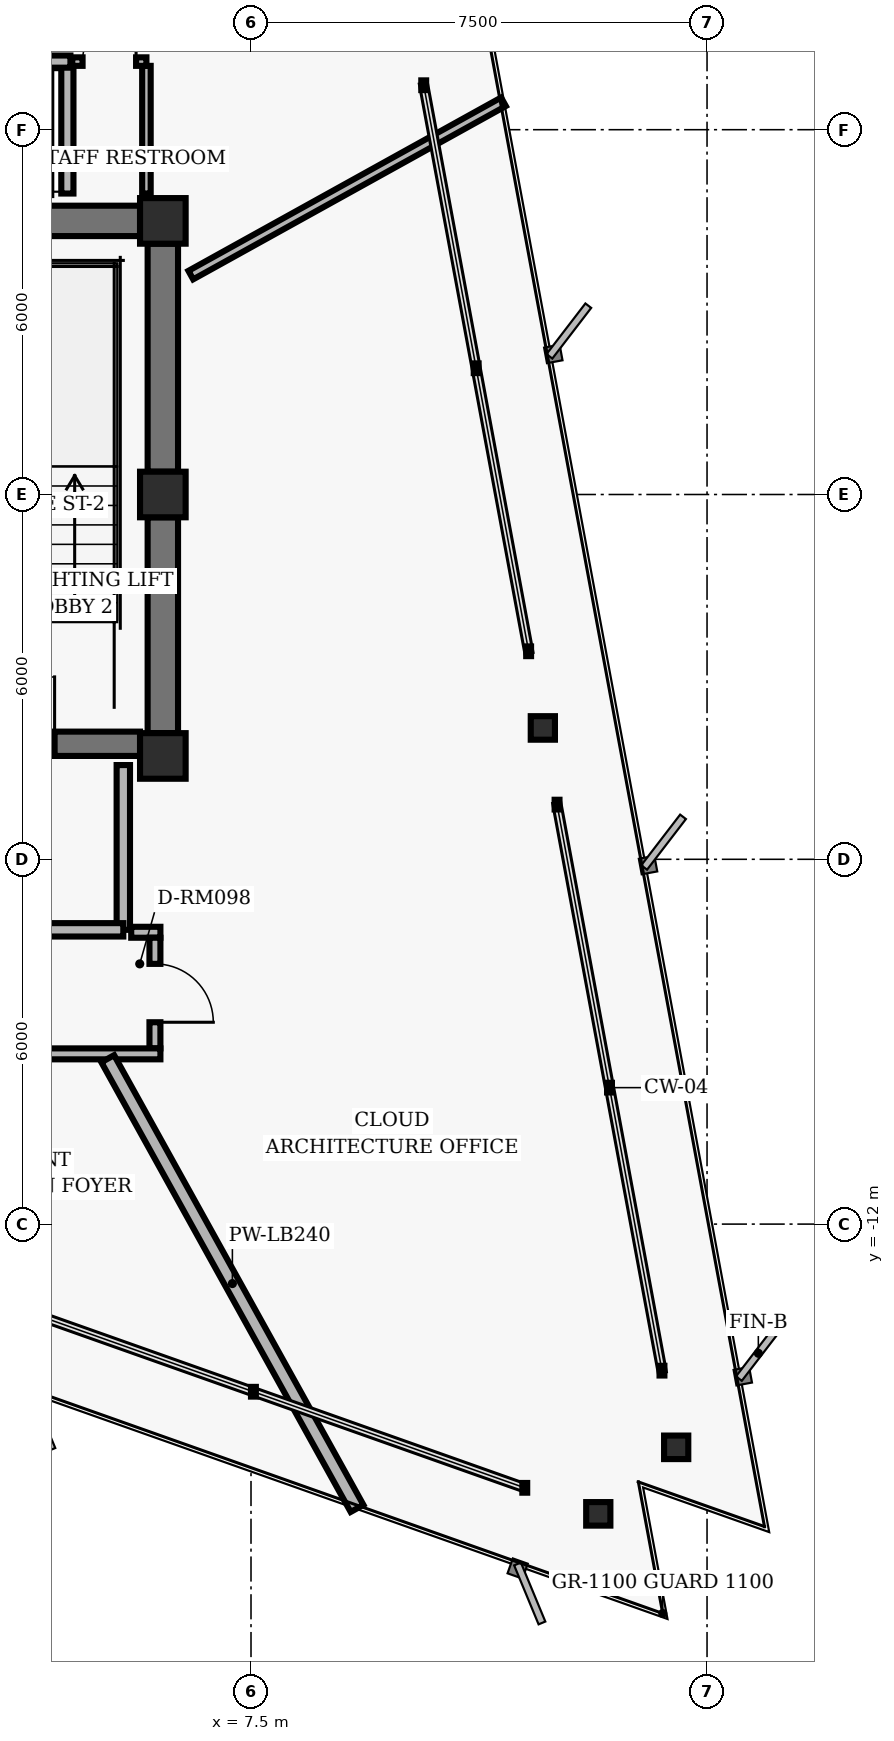
"""IFC4 building model, lengths in metres.
Left out: names, types, materials, properties, quantities, classifications, styles, units other than length and angle.
Written with IfcOpenShell. Run it as: python <this file> out.ifc"""

import sys

from ifc_helpers import new_model, si_unit, direction, frame, frame_2d, origin, origin_2d, place, context, subcontext, project, spatial, rectangle, hollow_rectangle, i_section, extrude, element, fill, save


model = new_model("IFC4")
c1 = context("Model", 3, precision=1e-05, world=origin(), true_north=direction((0.0, 1.0)))
c2 = subcontext(c1, "Body", "Model", "MODEL_VIEW")
j1 = project(units=[si_unit("LENGTHUNIT", "METRE"), si_unit("PLANEANGLEUNIT", "RADIAN")], contexts=[c1])
p1 = place(None, origin())
s1 = spatial("IfcSite", under=j1, at=p1, CompositionType="ELEMENT")
p2 = place(p1, origin())
s2 = spatial("IfcBuilding", under=s1, at=p2, CompositionType="ELEMENT")
p3 = place(p2, frame((0.0, 0.0, 178.4)))
s3 = spatial("IfcBuildingStorey", under=s2, at=p3, CompositionType="ELEMENT", Elevation=178.4)
for number, where, z_axis, x_axis in (
    (1, (6.05, 4.5, 0.0), (0.0, 0.0, 1.0), (1.0, 0.0, 0.0)),
    (2, (6.05, 0.0, 0.0), (0.0, 0.0, 1.0), (1.0, 0.0, 0.0)),
    (3, (6.05, -4.3, 0.0), (0.0, 0.0, 1.0), (1.0, 0.0, 0.0)),
):
    element("IfcColumn", number, at=place(p3, frame(where, z_axis=z_axis, x_axis=x_axis)), inside=s3, PredefinedType="COLUMN", context=c2, shape_type="SweptSolid", body=[
        extrude(hollow_rectangle(XDim=0.75, YDim=0.75, WallThickness=0.05, InnerFilletRadius=0.02, OuterFilletRadius=0.04, at=origin_2d()), origin(), (0.0, 0.0, 1.0), 3.04),
    ])
p4 = place(p3, frame((6.05, 0.375, 0.0), z_axis=(0.0, 0.0, 1.0), x_axis=(0.0, 1.0, 0.0)))
e4 = element("IfcWall", 4, at=p4, inside=s3, PredefinedType="SHEAR", context=c2, shape_type="SweptSolid", body=[
    extrude(rectangle(XDim=3.75, YDim=0.5, at=frame_2d((1.875, 0.0))), origin(), (0.0, 0.0, 1.0), 2.798),
])
p5 = place(p3, frame((6.05, -3.925, 0.0), z_axis=(0.0, 0.0, 1.0), x_axis=(0.0, 1.0, 0.0)))
e5 = element("IfcWall", 5, at=p5, inside=s3, PredefinedType="SHEAR", context=c2, shape_type="SweptSolid", body=[
    extrude(rectangle(XDim=3.55, YDim=0.5, at=frame_2d((1.775, 0.0))), origin(), (0.0, 0.0, 1.0), 2.798),
])
p6 = place(p3, frame((-5.675, -4.1, 0.0), z_axis=(0.0, 0.0, 1.0), x_axis=(1.0, 0.0, 0.0)))
e6 = element("IfcWall", 6, at=p6, inside=s3, PredefinedType="SHEAR", context=c2, shape_type="SweptSolid", body=[
    extrude(rectangle(XDim=11.35, YDim=0.4, at=frame_2d((5.675, 0.0))), origin(), (0.0, 0.0, 1.0), 2.798),
])
p7 = place(p6, frame((1.405, 0.0, 0.0)))
e7 = element("IfcOpeningElement", 7, at=p7, cuts=e6, PredefinedType="OPENING", context=c2, shape_type="SweptSolid", body=[
    extrude(rectangle(XDim=1.1, YDim=2.04, at=frame_2d((0.55, 1.02))), frame((0.0, 0.21, 0.0), z_axis=(0.0, -1.0, 0.0), x_axis=(1.0, 0.0, 0.0)), (0.0, 0.0, 1.0), 0.42),
])
p8 = place(p6, frame((8.845, 0.0, 0.0)))
e8 = element("IfcOpeningElement", 8, at=p8, cuts=e6, PredefinedType="OPENING", context=c2, shape_type="SweptSolid", body=[
    extrude(rectangle(XDim=1.1, YDim=2.04, at=frame_2d((0.55, 1.02))), frame((0.0, 0.21, 0.0), z_axis=(0.0, -1.0, 0.0), x_axis=(1.0, 0.0, 0.0)), (0.0, 0.0, 1.0), 0.42),
])
p9 = place(p6, frame((4.145, 0.0, 0.0)))
e9 = element("IfcOpeningElement", 9, at=p9, cuts=e6, PredefinedType="OPENING", context=c2, shape_type="SweptSolid", body=[
    extrude(rectangle(XDim=1.06, YDim=2.04, at=frame_2d((0.53, 1.02))), frame((0.0, 0.21, 0.0), z_axis=(0.0, -1.0, 0.0), x_axis=(1.0, 0.0, 0.0)), (0.0, 0.0, 1.0), 0.42),
])
p10 = place(p6, frame((6.145, 0.0, 0.0)))
e10 = element("IfcOpeningElement", 10, at=p10, cuts=e6, PredefinedType="OPENING", context=c2, shape_type="SweptSolid", body=[
    extrude(rectangle(XDim=1.06, YDim=2.04, at=frame_2d((0.53, 1.02))), frame((0.0, 0.21, 0.0), z_axis=(0.0, -1.0, 0.0), x_axis=(1.0, 0.0, 0.0)), (0.0, 0.0, 1.0), 0.42),
])
p11 = place(p3, frame((2.05, 4.5, 0.0), z_axis=(0.0, 0.0, 1.0), x_axis=(1.0, 0.0, 0.0)))
e11 = element("IfcWall", 11, at=p11, inside=s3, PredefinedType="SHEAR", context=c2, shape_type="SweptSolid", body=[
    extrude(rectangle(XDim=3.625, YDim=0.5, at=frame_2d((1.812, 0.0))), origin(), (0.0, 0.0, 1.0), 2.798),
])
for number, where, z_axis, x_axis in (
    (12, (14.492, -15.671, 0.0), (0.0, 0.0, 1.0), (1.0, 0.0, 0.0)),
    (13, (12.3, -3.84, 0.0), (0.0, 0.0, 1.0), (1.0, 0.0, 0.0)),
    (14, (13.211, -16.766, 0.0), (0.0, 0.0, 1.0), (1.0, 0.0, 0.0)),
):
    element("IfcColumn", number, at=place(p3, frame(where, z_axis=z_axis, x_axis=x_axis)), inside=s3, PredefinedType="COLUMN", context=c2, shape_type="SweptSolid", body=[
        extrude(i_section(OverallWidth=0.398, OverallDepth=0.387, WebThickness=0.021, FlangeThickness=0.033, FilletRadius=0.018, at=origin_2d()), origin(), (0.0, 0.0, 1.0), 3.04),
    ])
p12 = place(p3, frame((5.4, -7.16, 0.0), z_axis=(0.0, 0.0, 1.0), x_axis=(0.0, 1.0, 0.0)))
e15 = element("IfcWall", 15, at=p12, inside=s3, PredefinedType="PARTITIONING", context=c2, shape_type="SweptSolid", body=[
    extrude(rectangle(XDim=2.71, YDim=0.22, at=frame_2d((1.355, 0.0))), origin(), (0.0, 0.0, 1.0), 2.773),
])
p13 = place(p3, frame((0.0, -7.16, 0.0), z_axis=(0.0, 0.0, 1.0), x_axis=(1.0, 0.0, 0.0)))
e16 = element("IfcWall", 16, at=p13, inside=s3, PredefinedType="PARTITIONING", context=c2, shape_type="SweptSolid", body=[
    extrude(rectangle(XDim=5.4, YDim=0.22, at=frame_2d((2.7, 0.0))), origin(), (0.0, 0.0, 1.0), 2.395),
])
p14 = place(p13, frame((2.05, 0.0, 0.0)))
e17 = element("IfcOpeningElement", 17, at=p14, cuts=e16, PredefinedType="OPENING", context=c2, shape_type="SweptSolid", body=[
    extrude(rectangle(XDim=1.12, YDim=2.02, at=frame_2d((0.56, 1.01))), frame((0.0, 0.12, 0.0), z_axis=(0.0, -1.0, 0.0), x_axis=(1.0, 0.0, 0.0)), (0.0, 0.0, 1.0), 0.24),
])
p15 = place(p3, frame((4.48, 4.95, 0.0), z_axis=(0.0, 0.0, 1.0), x_axis=(0.0, 1.0, 0.0)))
e18 = element("IfcWall", 18, at=p15, inside=s3, PredefinedType="PARTITIONING", context=c2, shape_type="SweptSolid", body=[
    extrude(rectangle(XDim=2.1, YDim=0.2, at=frame_2d((1.05, 0.0))), origin(), (0.0, 0.0, 1.0), 2.773),
])
p16 = place(p3, frame((2.15, 7.12, 0.0), z_axis=(0.0, 0.0, 1.0), x_axis=(1.0, 0.0, 0.0)))
e19 = element("IfcWall", 19, at=p16, inside=s3, PredefinedType="PARTITIONING", context=c2, shape_type="SweptSolid", body=[
    extrude(rectangle(XDim=2.38, YDim=0.2, at=frame_2d((1.19, 0.0))), origin(), (0.0, 0.0, 1.0), 2.773),
])
p17 = place(p16, frame((0.56, 0.0, 0.0)))
e20 = element("IfcOpeningElement", 20, at=p17, cuts=e19, PredefinedType="OPENING", context=c2, shape_type="SweptSolid", body=[
    extrude(rectangle(XDim=1.26, YDim=2.06, at=frame_2d((0.63, 1.03))), frame((0.0, 0.11, 0.0), z_axis=(0.0, -1.0, 0.0), x_axis=(1.0, 0.0, 0.0)), (0.0, 0.0, 1.0), 0.22),
])
p18 = place(p3, frame((5.78, 4.95, 0.0), z_axis=(0.0, 0.0, 1.0), x_axis=(0.0, 1.0, 0.0)))
e21 = element("IfcWall", 21, at=p18, inside=s3, PredefinedType="PARTITIONING", context=c2, shape_type="SweptSolid", body=[
    extrude(rectangle(XDim=2.1, YDim=0.14, at=frame_2d((1.05, 0.0))), origin(), (0.0, 0.0, 1.0), 2.253),
])
p19 = place(p3, frame((4.56, 7.12, 0.0), z_axis=(0.0, 0.0, 1.0), x_axis=(1.0, 0.0, 0.0)))
e22 = element("IfcWall", 22, at=p19, inside=s3, PredefinedType="PARTITIONING", context=c2, shape_type="SweptSolid", body=[
    extrude(rectangle(XDim=1.22, YDim=0.14, at=frame_2d((0.61, 0.0))), origin(), (0.0, 0.0, 1.0), 2.773),
])
p20 = place(p19, frame((0.17, 0.0, 0.0)))
e23 = element("IfcOpeningElement", 23, at=p20, cuts=e22, PredefinedType="OPENING", context=c2, shape_type="SweptSolid", body=[
    extrude(rectangle(XDim=0.88, YDim=2.02, at=frame_2d((0.44, 1.01))), frame((0.0, 0.08, 0.0), z_axis=(0.0, -1.0, 0.0), x_axis=(1.0, 0.0, 0.0)), (0.0, 0.0, 1.0), 0.16),
])
p21 = place(p3, frame((5.53, -7.2, 0.0), z_axis=(0.0, 0.0, 1.0), x_axis=(1.0, 0.0, 0.0)))
e24 = element("IfcWall", 24, at=p21, inside=s3, PredefinedType="PARTITIONING", context=c2, shape_type="SweptSolid", body=[
    extrude(rectangle(XDim=0.48, YDim=0.18, at=frame_2d((0.24, 0.0))), origin(), (0.0, 0.0, 1.0), 2.773),
])
p22 = place(p3, frame((5.92, -7.29, 0.0), z_axis=(0.0, 0.0, 1.0), x_axis=(0.0, -1.0, 0.0)))
e25 = element("IfcWall", 25, at=p22, inside=s3, PredefinedType="PARTITIONING", context=c2, shape_type="SweptSolid", body=[
    extrude(rectangle(XDim=1.82, YDim=0.18, at=frame_2d((0.91, 0.0))), origin(), (0.0, 0.0, 1.0), 2.773),
])
p23 = place(p22, frame((0.43, 0.0, 0.0)))
e26 = element("IfcOpeningElement", 26, at=p23, cuts=e25, PredefinedType="OPENING", context=c2, shape_type="SweptSolid", body=[
    extrude(rectangle(XDim=0.96, YDim=2.02, at=frame_2d((0.48, 1.01))), frame((0.0, 0.1, 0.0), z_axis=(0.0, -1.0, 0.0), x_axis=(1.0, 0.0, 0.0)), (0.0, 0.0, 1.0), 0.2),
])
p24 = place(p3, frame((6.01, -9.2, 0.0), z_axis=(0.0, 0.0, 1.0), x_axis=(-1.0, 0.0, 0.0)))
e27 = element("IfcWall", 27, at=p24, inside=s3, PredefinedType="PARTITIONING", context=c2, shape_type="SweptSolid", body=[
    extrude(rectangle(XDim=13.3, YDim=0.18, at=frame_2d((6.65, 0.0))), origin(), (0.0, 0.0, 1.0), 2.395),
])
p25 = place(p24, frame((10.465, 0.0, 0.0)))
e28 = element("IfcOpeningElement", 28, at=p25, cuts=e27, PredefinedType="OPENING", context=c2, shape_type="SweptSolid", body=[
    extrude(rectangle(XDim=0.96, YDim=2.02, at=frame_2d((0.48, 1.01))), frame((0.0, 0.1, 0.0), z_axis=(0.0, -1.0, 0.0), x_axis=(1.0, 0.0, 0.0)), (0.0, 0.0, 1.0), 0.2),
])
p26 = place(p24, frame((4.373, 0.0, 0.0)))
e29 = element("IfcOpeningElement", 29, at=p26, cuts=e27, PredefinedType="OPENING", context=c2, shape_type="SweptSolid", body=[
    extrude(rectangle(XDim=0.96, YDim=2.02, at=frame_2d((0.48, 1.01))), frame((0.0, 0.1, 0.0), z_axis=(0.0, -1.0, 0.0), x_axis=(1.0, 0.0, 0.0)), (0.0, 0.0, 1.0), 0.2),
])
p27 = place(p3, frame((5.144, -9.28, 0.0), z_axis=(0.0, 0.0, 1.0), x_axis=(0.484804355006, -0.874622625689, 0.0)))
e30 = element("IfcWall", 30, at=p27, inside=s3, PredefinedType="PARTITIONING", context=c2, shape_type="SweptSolid", body=[
    extrude(rectangle(XDim=8.456, YDim=0.24, at=frame_2d((4.228, 0.0))), origin(), (0.0, 0.0, 1.0), 2.773),
])
p28 = place(p3, frame((6.51, 3.609, 0.0), z_axis=(0.0, 0.0, 1.0), x_axis=(0.874634801292, 0.484782388675, 0.0)))
e31 = element("IfcWall", 31, at=p28, inside=s3, PredefinedType="PARTITIONING", context=c2, shape_type="SweptSolid", body=[
    extrude(rectangle(XDim=5.879, YDim=0.16, at=frame_2d((2.939, 0.0))), origin(), (0.0, 0.0, 1.0), 2.773),
])
p29 = place(p8, origin())
e32 = element("IfcDoor", 32, at=p29, inside=s3, OperationType="SINGLE_SWING_RIGHT", PredefinedType="DOOR", context=c2, shape_type="SweptSolid", body=[
    extrude(rectangle(XDim=1.1, YDim=2.04, at=frame_2d((0.55, 1.02))), frame((0.0, 0.025, 0.0), z_axis=(0.0, -1.0, 0.0), x_axis=(1.0, 0.0, 0.0)), (0.0, 0.0, 1.0), 0.05),
])
fill(e8, e32)
p30 = place(p20, origin())
e33 = element("IfcDoor", 33, at=p30, inside=s3, OperationType="SINGLE_SWING_RIGHT", PredefinedType="DOOR", context=c2, shape_type="SweptSolid", body=[
    extrude(rectangle(XDim=0.88, YDim=2.02, at=frame_2d((0.44, 1.01))), frame((0.0, 0.025, 0.0), z_axis=(0.0, -1.0, 0.0), x_axis=(1.0, 0.0, 0.0)), (0.0, 0.0, 1.0), 0.05),
])
fill(e23, e33)
p31 = place(p23, origin())
e34 = element("IfcDoor", 34, at=p31, inside=s3, OperationType="SINGLE_SWING_RIGHT", PredefinedType="DOOR", context=c2, shape_type="SweptSolid", body=[
    extrude(rectangle(XDim=0.96, YDim=2.02, at=frame_2d((0.48, 1.01))), frame((0.0, 0.025, 0.0), z_axis=(0.0, -1.0, 0.0), x_axis=(1.0, 0.0, 0.0)), (0.0, 0.0, 1.0), 0.05),
])
fill(e26, e34)
save(model, sys.argv[1])
